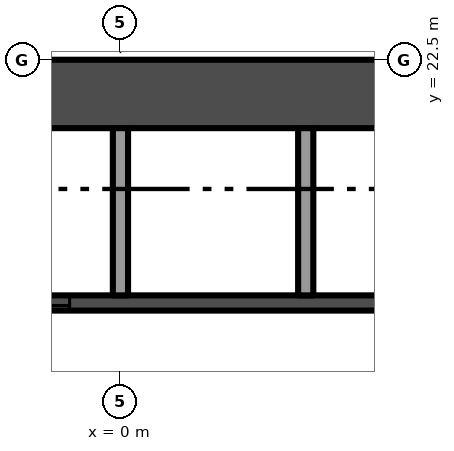
"""IFC4 building model, lengths in metres.
Left out: names, types, materials, properties, quantities, classifications, styles, units other than length and angle.
Written with IfcOpenShell. Run it as: python <this file> out.ifc"""

import sys

from ifc_helpers import new_model, si_unit, direction, frame, frame_2d, origin, place, context, subcontext, project, spatial, rectangle, extrude, element, fill, save


model = new_model("IFC4")
c1 = context("Model", 3, precision=1e-05, world=origin(), true_north=direction((0.0, 1.0)))
c2 = subcontext(c1, "Body", "Model", "MODEL_VIEW")
j1 = project(units=[si_unit("LENGTHUNIT", "METRE"), si_unit("PLANEANGLEUNIT", "RADIAN")], contexts=[c1])
p1 = place(None, origin())
s1 = spatial("IfcSite", under=j1, at=p1, CompositionType="ELEMENT")
p2 = place(p1, origin())
s2 = spatial("IfcBuilding", under=s1, at=p2, CompositionType="ELEMENT")
p3 = place(p2, frame((0.0, 0.0, 77.0)))
s3 = spatial("IfcBuildingStorey", under=s2, at=p3, CompositionType="ELEMENT", Elevation=77.0)
p4 = place(p3, frame((13.5, 22.05, -0.3), z_axis=(0.0, 0.0, 1.0), x_axis=(-1.0, 0.0, 0.0)))
e1 = element("IfcWall", 1, at=p4, inside=s3, PredefinedType="SHEAR", context=c2, shape_type="SweptSolid", body=[
    extrude(rectangle(XDim=27.0, YDim=0.9, at=frame_2d((13.5, 0.0))), origin(), (0.0, 0.0, 1.0), 3.8),
])
p5 = place(p3, frame((-9.85, 19.3, 0.0), z_axis=(0.0, 0.0, 1.0), x_axis=(1.0, 0.0, 0.0)))
e2 = element("IfcWall", 2, at=p5, inside=s3, PredefinedType="SHEAR", context=c2, shape_type="SweptSolid", body=[
    extrude(rectangle(XDim=19.7, YDim=0.2, at=frame_2d((9.85, 0.0))), origin(), (0.0, 0.0, 1.0), 3.5),
])
p6 = place(p5, frame((0.769, 0.0, 0.0)))
e3 = element("IfcOpeningElement", 3, at=p6, cuts=e2, PredefinedType="OPENING", context=c2, shape_type="SweptSolid", body=[
    extrude(rectangle(XDim=1.1, YDim=2.1, at=frame_2d((0.55, 1.05))), frame((0.0, 0.11, 0.0), z_axis=(0.0, -1.0, 0.0), x_axis=(1.0, 0.0, 0.0)), (0.0, 0.0, 1.0), 0.22),
])
p7 = place(p5, frame((3.206, 0.0, 0.0)))
e4 = element("IfcOpeningElement", 4, at=p7, cuts=e2, PredefinedType="OPENING", context=c2, shape_type="SweptSolid", body=[
    extrude(rectangle(XDim=1.1, YDim=2.1, at=frame_2d((0.55, 1.05))), frame((0.0, 0.11, 0.0), z_axis=(0.0, -1.0, 0.0), x_axis=(1.0, 0.0, 0.0)), (0.0, 0.0, 1.0), 0.22),
])
p8 = place(p5, frame((5.644, 0.0, 0.0)))
e5 = element("IfcOpeningElement", 5, at=p8, cuts=e2, PredefinedType="OPENING", context=c2, shape_type="SweptSolid", body=[
    extrude(rectangle(XDim=1.1, YDim=2.1, at=frame_2d((0.55, 1.05))), frame((0.0, 0.11, 0.0), z_axis=(0.0, -1.0, 0.0), x_axis=(1.0, 0.0, 0.0)), (0.0, 0.0, 1.0), 0.22),
])
p9 = place(p5, frame((8.081, 0.0, 0.0)))
e6 = element("IfcOpeningElement", 6, at=p9, cuts=e2, PredefinedType="OPENING", context=c2, shape_type="SweptSolid", body=[
    extrude(rectangle(XDim=1.1, YDim=2.1, at=frame_2d((0.55, 1.05))), frame((0.0, 0.11, 0.0), z_axis=(0.0, -1.0, 0.0), x_axis=(1.0, 0.0, 0.0)), (0.0, 0.0, 1.0), 0.22),
])
for number, where, z_axis, x_axis in (
    (7, (0.0, 19.4, 0.0), (0.0, 0.0, 1.0), (0.0, 1.0, 0.0)),
    (8, (2.438, 19.4, 0.0), (0.0, 0.0, 1.0), (0.0, 1.0, 0.0)),
):
    element("IfcWall", number, at=place(p3, frame(where, z_axis=z_axis, x_axis=x_axis)), inside=s3, PredefinedType="PARTITIONING", context=c2, shape_type="SweptSolid", body=[
        extrude(rectangle(XDim=2.2, YDim=0.2, at=frame_2d((1.1, 0.0))), origin(), (0.0, 0.0, 1.0), 3.5),
    ])
p10 = place(p9, origin())
e9 = element("IfcDoor", 9, at=p10, inside=s3, OperationType="SLIDING_TO_LEFT", PredefinedType="DOOR", context=c2, shape_type="SweptSolid", body=[
    extrude(rectangle(XDim=1.1, YDim=2.1, at=frame_2d((0.55, 1.05))), frame((0.0, 0.025, 0.0), z_axis=(0.0, -1.0, 0.0), x_axis=(1.0, 0.0, 0.0)), (0.0, 0.0, 1.0), 0.05),
])
fill(e6, e9)
save(model, sys.argv[1])
